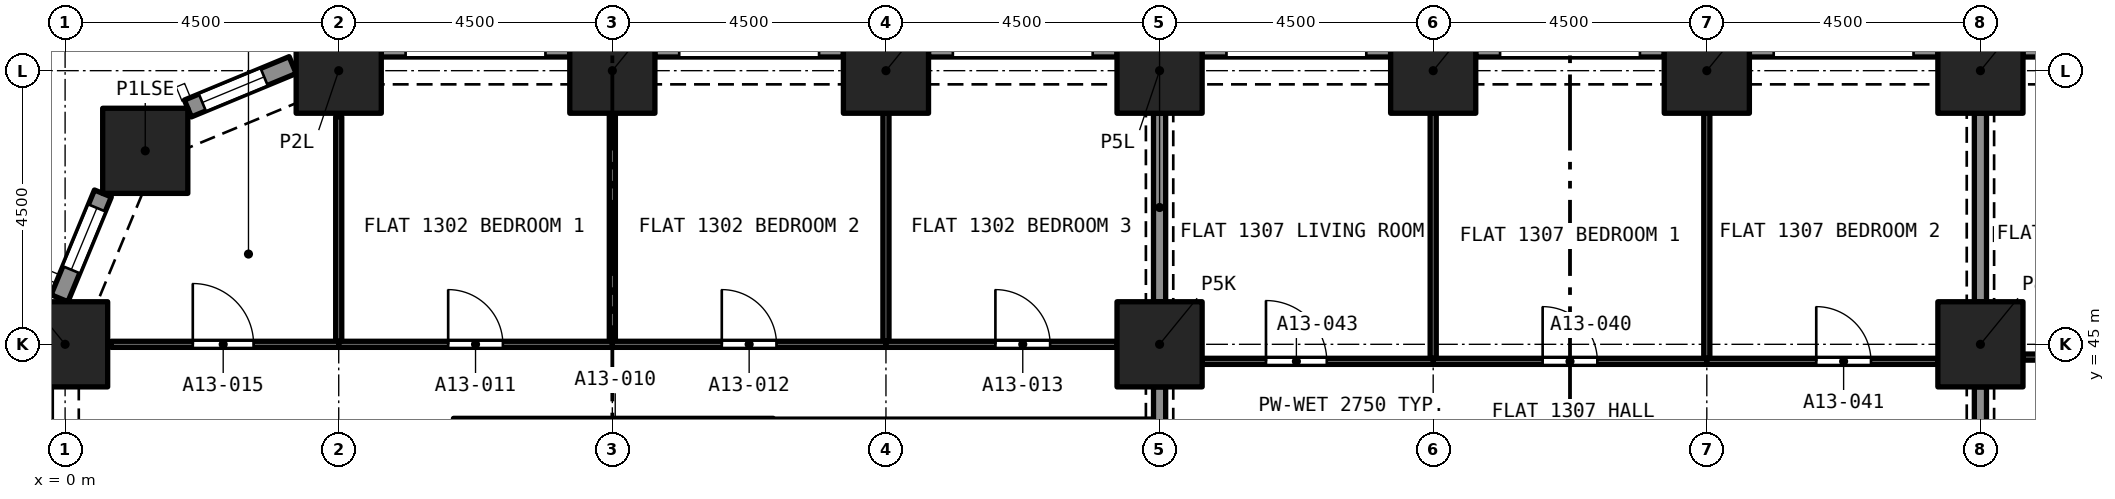
"""IFC4 building model, lengths in metres.
Left out: names, types, materials, properties, quantities, classifications, styles, units other than length and angle.
Written with IfcOpenShell. Run it as: python <this file> out.ifc"""

import sys

from ifc_helpers import new_model, si_unit, direction, frame, frame_2d, origin, origin_2d, place, context, subcontext, project, spatial, rectangle, extrude, element, fill, save


model = new_model("IFC4")
c1 = context("Model", 3, precision=1e-05, world=origin(), true_north=direction((0.0, 1.0)))
c2 = subcontext(c1, "Body", "Model", "MODEL_VIEW")
j1 = project(units=[si_unit("LENGTHUNIT", "METRE"), si_unit("PLANEANGLEUNIT", "RADIAN")], contexts=[c1])
p1 = place(None, origin())
s1 = spatial("IfcSite", under=j1, at=p1, CompositionType="ELEMENT")
p2 = place(p1, origin())
s2 = spatial("IfcBuilding", under=s1, at=p2, CompositionType="ELEMENT")
p3 = place(p2, frame((0.0, 0.0, 52.8)))
s3 = spatial("IfcBuildingStorey", under=s2, at=p3, CompositionType="ELEMENT", Elevation=52.8)
for number, where, z_axis, x_axis in (
    (1, (0.0, 45.0, 0.0), (0.0, 0.0, 1.0), (1.0, 0.0, 0.0)),
    (2, (18.0, 45.0, 0.0), (0.0, 0.0, 1.0), (1.0, 0.0, 0.0)),
    (3, (31.5, 45.0, 0.0), (0.0, 0.0, 1.0), (1.0, 0.0, 0.0)),
    (4, (1.318, 48.182, 0.0), (0.0, 0.0, 1.0), (1.0, 0.0, 0.0)),
    (5, (4.5, 49.5, 0.0), (0.0, 0.0, 1.0), (1.0, 0.0, 0.0)),
    (6, (9.0, 49.5, 0.0), (0.0, 0.0, 1.0), (1.0, 0.0, 0.0)),
    (7, (13.5, 49.5, 0.0), (0.0, 0.0, 1.0), (1.0, 0.0, 0.0)),
    (8, (18.0, 49.5, 0.0), (0.0, 0.0, 1.0), (1.0, 0.0, 0.0)),
    (9, (22.5, 49.5, 0.0), (0.0, 0.0, 1.0), (1.0, 0.0, 0.0)),
    (10, (27.0, 49.5, 0.0), (0.0, 0.0, 1.0), (1.0, 0.0, 0.0)),
    (11, (31.5, 49.5, 0.0), (0.0, 0.0, 1.0), (1.0, 0.0, 0.0)),
):
    element("IfcColumn", number, at=place(p3, frame(where, z_axis=z_axis, x_axis=x_axis)), inside=s3, PredefinedType="COLUMN", context=c2, shape_type="SweptSolid", body=[
        extrude(rectangle(XDim=1.4, YDim=1.4, at=origin_2d()), origin(), (0.0, 0.0, 1.0), 3.2),
    ])
p4 = place(p3, frame((32.2, 49.875, 0.0), z_axis=(0.0, 0.0, 1.0), x_axis=(1.0, 0.0, 0.0)))
e12 = element("IfcWall", 12, at=p4, inside=s3, PredefinedType="SOLIDWALL", context=c2, shape_type="SweptSolid", body=[
    extrude(rectangle(XDim=3.1, YDim=0.3, at=frame_2d((1.55, 0.0))), origin(), (0.0, 0.0, 1.0), 3.2),
])
p5 = place(p4, frame((0.4, 0.0, 0.45)))
e13 = element("IfcOpeningElement", 13, at=p5, cuts=e12, PredefinedType="OPENING", context=c2, shape_type="SweptSolid", body=[
    extrude(rectangle(XDim=2.3, YDim=1.95, at=frame_2d((1.15, 0.975))), frame((0.0, 0.16, 0.0), z_axis=(0.0, -1.0, 0.0), x_axis=(1.0, 0.0, 0.0)), (0.0, 0.0, 1.0), 0.32),
])
p6 = place(p3, frame((27.7, 49.875, 0.0), z_axis=(0.0, 0.0, 1.0), x_axis=(1.0, 0.0, 0.0)))
e14 = element("IfcWall", 14, at=p6, inside=s3, PredefinedType="SOLIDWALL", context=c2, shape_type="SweptSolid", body=[
    extrude(rectangle(XDim=3.1, YDim=0.3, at=frame_2d((1.55, 0.0))), origin(), (0.0, 0.0, 1.0), 3.2),
])
p7 = place(p6, frame((0.4, 0.0, 0.45)))
e15 = element("IfcOpeningElement", 15, at=p7, cuts=e14, PredefinedType="OPENING", context=c2, shape_type="SweptSolid", body=[
    extrude(rectangle(XDim=2.3, YDim=1.95, at=frame_2d((1.15, 0.975))), frame((0.0, 0.16, 0.0), z_axis=(0.0, -1.0, 0.0), x_axis=(1.0, 0.0, 0.0)), (0.0, 0.0, 1.0), 0.32),
])
p8 = place(p3, frame((23.2, 49.875, 0.0), z_axis=(0.0, 0.0, 1.0), x_axis=(1.0, 0.0, 0.0)))
e16 = element("IfcWall", 16, at=p8, inside=s3, PredefinedType="SOLIDWALL", context=c2, shape_type="SweptSolid", body=[
    extrude(rectangle(XDim=3.1, YDim=0.3, at=frame_2d((1.55, 0.0))), origin(), (0.0, 0.0, 1.0), 3.2),
])
p9 = place(p8, frame((0.4, 0.0, 0.45)))
e17 = element("IfcOpeningElement", 17, at=p9, cuts=e16, PredefinedType="OPENING", context=c2, shape_type="SweptSolid", body=[
    extrude(rectangle(XDim=2.3, YDim=1.95, at=frame_2d((1.15, 0.975))), frame((0.0, 0.16, 0.0), z_axis=(0.0, -1.0, 0.0), x_axis=(1.0, 0.0, 0.0)), (0.0, 0.0, 1.0), 0.32),
])
p10 = place(p3, frame((18.7, 49.875, 0.0), z_axis=(0.0, 0.0, 1.0), x_axis=(1.0, 0.0, 0.0)))
e18 = element("IfcWall", 18, at=p10, inside=s3, PredefinedType="SOLIDWALL", context=c2, shape_type="SweptSolid", body=[
    extrude(rectangle(XDim=3.1, YDim=0.3, at=frame_2d((1.55, 0.0))), origin(), (0.0, 0.0, 1.0), 3.2),
])
p11 = place(p10, frame((0.4, 0.0, 0.45)))
e19 = element("IfcOpeningElement", 19, at=p11, cuts=e18, PredefinedType="OPENING", context=c2, shape_type="SweptSolid", body=[
    extrude(rectangle(XDim=2.3, YDim=1.95, at=frame_2d((1.15, 0.975))), frame((0.0, 0.16, 0.0), z_axis=(0.0, -1.0, 0.0), x_axis=(1.0, 0.0, 0.0)), (0.0, 0.0, 1.0), 0.32),
])
p12 = place(p3, frame((14.2, 49.875, 0.0), z_axis=(0.0, 0.0, 1.0), x_axis=(1.0, 0.0, 0.0)))
e20 = element("IfcWall", 20, at=p12, inside=s3, PredefinedType="SOLIDWALL", context=c2, shape_type="SweptSolid", body=[
    extrude(rectangle(XDim=3.1, YDim=0.3, at=frame_2d((1.55, 0.0))), origin(), (0.0, 0.0, 1.0), 3.2),
])
p13 = place(p12, frame((0.4, 0.0, 0.45)))
e21 = element("IfcOpeningElement", 21, at=p13, cuts=e20, PredefinedType="OPENING", context=c2, shape_type="SweptSolid", body=[
    extrude(rectangle(XDim=2.3, YDim=1.95, at=frame_2d((1.15, 0.975))), frame((0.0, 0.16, 0.0), z_axis=(0.0, -1.0, 0.0), x_axis=(1.0, 0.0, 0.0)), (0.0, 0.0, 1.0), 0.32),
])
p14 = place(p3, frame((9.7, 49.875, 0.0), z_axis=(0.0, 0.0, 1.0), x_axis=(1.0, 0.0, 0.0)))
e22 = element("IfcWall", 22, at=p14, inside=s3, PredefinedType="SOLIDWALL", context=c2, shape_type="SweptSolid", body=[
    extrude(rectangle(XDim=3.1, YDim=0.3, at=frame_2d((1.55, 0.0))), origin(), (0.0, 0.0, 1.0), 3.2),
])
p15 = place(p14, frame((0.4, 0.0, 0.45)))
e23 = element("IfcOpeningElement", 23, at=p15, cuts=e22, PredefinedType="OPENING", context=c2, shape_type="SweptSolid", body=[
    extrude(rectangle(XDim=2.3, YDim=1.95, at=frame_2d((1.15, 0.975))), frame((0.0, 0.16, 0.0), z_axis=(0.0, -1.0, 0.0), x_axis=(1.0, 0.0, 0.0)), (0.0, 0.0, 1.0), 0.32),
])
p16 = place(p3, frame((5.2, 49.875, 0.0), z_axis=(0.0, 0.0, 1.0), x_axis=(1.0, 0.0, 0.0)))
e24 = element("IfcWall", 24, at=p16, inside=s3, PredefinedType="SOLIDWALL", context=c2, shape_type="SweptSolid", body=[
    extrude(rectangle(XDim=3.1, YDim=0.3, at=frame_2d((1.55, 0.0))), origin(), (0.0, 0.0, 1.0), 3.2),
])
p17 = place(p16, frame((0.4, 0.0, 0.45)))
e25 = element("IfcOpeningElement", 25, at=p17, cuts=e24, PredefinedType="OPENING", context=c2, shape_type="SweptSolid", body=[
    extrude(rectangle(XDim=2.3, YDim=1.95, at=frame_2d((1.15, 0.975))), frame((0.0, 0.16, 0.0), z_axis=(0.0, -1.0, 0.0), x_axis=(1.0, 0.0, 0.0)), (0.0, 0.0, 1.0), 0.32),
])
p18 = place(p3, frame((2.02, 48.878, 0.0), z_axis=(0.0, 0.0, 1.0), x_axis=(0.923903565336, 0.38262540684, 0.0)))
e26 = element("IfcWall", 26, at=p18, inside=s3, PredefinedType="SOLIDWALL", context=c2, shape_type="SweptSolid", body=[
    extrude(rectangle(XDim=1.865, YDim=0.3, at=frame_2d((0.933, 0.0))), origin(), (0.0, 0.0, 1.0), 3.2),
])
p19 = place(p18, frame((0.258, 0.0, 0.45)))
e27 = element("IfcOpeningElement", 27, at=p19, cuts=e26, PredefinedType="OPENING", context=c2, shape_type="SweptSolid", body=[
    extrude(rectangle(XDim=1.1, YDim=1.95, at=frame_2d((0.55, 0.975))), frame((0.0, 0.16, 0.0), z_axis=(0.0, -1.0, 0.0), x_axis=(1.0, 0.0, 0.0)), (0.0, 0.0, 1.0), 0.32),
])
p20 = place(p3, frame((-0.092, 45.757, 0.0), z_axis=(0.0, 0.0, 1.0), x_axis=(0.382737135771, 0.923857286003, 0.0)))
e28 = element("IfcWall", 28, at=p20, inside=s3, PredefinedType="SOLIDWALL", context=c2, shape_type="SweptSolid", body=[
    extrude(rectangle(XDim=1.865, YDim=0.3, at=frame_2d((0.933, 0.0))), origin(), (0.0, 0.0, 1.0), 3.2),
])
p21 = place(p20, frame((0.508, 0.0, 0.45)))
e29 = element("IfcOpeningElement", 29, at=p21, cuts=e28, PredefinedType="OPENING", context=c2, shape_type="SweptSolid", body=[
    extrude(rectangle(XDim=1.1, YDim=1.95, at=frame_2d((0.55, 0.975))), frame((0.0, 0.16, 0.0), z_axis=(0.0, -1.0, 0.0), x_axis=(1.0, 0.0, 0.0)), (0.0, 0.0, 1.0), 0.32),
])
p22 = place(p3, frame((11.645, 43.72, 0.0), z_axis=(0.0, 0.0, 1.0), x_axis=(-1.0, 0.0, 0.0)))
e30 = element("IfcWall", 30, at=p22, inside=s3, PredefinedType="PARTITIONING", context=c2, shape_type="SweptSolid", body=[
    extrude(rectangle(XDim=5.258, YDim=0.125, at=frame_2d((2.629, 0.0))), origin(), (0.0, 0.0, 1.0), 2.9),
])
p23 = place(p22, frame((2.198, 0.0, 0.0)))
e31 = element("IfcOpeningElement", 31, at=p23, cuts=e30, PredefinedType="OPENING", context=c2, shape_type="SweptSolid", body=[
    extrude(rectangle(XDim=0.8, YDim=2.1, at=frame_2d((0.4, 1.05))), frame((0.0, 0.073, 0.0), z_axis=(0.0, -1.0, 0.0), x_axis=(1.0, 0.0, 0.0)), (0.0, 0.0, 1.0), 0.145),
])
p24 = place(p3, frame((9.0, 45.05, 0.0), z_axis=(0.0, 0.0, 1.0), x_axis=(0.0, 1.0, 0.0)))
e32 = element("IfcWall", 32, at=p24, inside=s3, PredefinedType="PARTITIONING", context=c2, shape_type="SweptSolid", body=[
    extrude(rectangle(XDim=3.75, YDim=0.1, at=frame_2d((1.875, 0.0))), origin(), (0.0, 0.0, 1.0), 2.9),
])
p25 = place(p3, frame((4.5, 45.0, 0.0), z_axis=(0.0, 0.0, 1.0), x_axis=(1.0, 0.0, 0.0)))
e33 = element("IfcWall", 33, at=p25, inside=s3, PredefinedType="PARTITIONING", context=c2, shape_type="SweptSolid", body=[
    extrude(rectangle(XDim=4.5, YDim=0.1, at=frame_2d((2.25, 0.0))), origin(), (0.0, 0.0, 1.0), 2.9),
])
p26 = place(p25, frame((1.8, 0.0, 0.0)))
e34 = element("IfcOpeningElement", 34, at=p26, cuts=e33, PredefinedType="OPENING", context=c2, shape_type="SweptSolid", body=[
    extrude(rectangle(XDim=0.9, YDim=2.1, at=frame_2d((0.45, 1.05))), frame((0.0, 0.06, 0.0), z_axis=(0.0, -1.0, 0.0), x_axis=(1.0, 0.0, 0.0)), (0.0, 0.0, 1.0), 0.12),
])
p27 = place(p3, frame((4.5, 45.05, 0.0), z_axis=(0.0, 0.0, 1.0), x_axis=(0.0, 1.0, 0.0)))
e35 = element("IfcWall", 35, at=p27, inside=s3, PredefinedType="PARTITIONING", context=c2, shape_type="SweptSolid", body=[
    extrude(rectangle(XDim=3.692, YDim=0.1, at=frame_2d((1.846, 0.0))), origin(), (0.0, 0.0, 1.0), 2.9),
])
p28 = place(p3, frame((13.5, 45.05, 0.0), z_axis=(0.0, 0.0, 1.0), x_axis=(0.0, 1.0, 0.0)))
e36 = element("IfcWall", 36, at=p28, inside=s3, PredefinedType="PARTITIONING", context=c2, shape_type="SweptSolid", body=[
    extrude(rectangle(XDim=3.75, YDim=0.1, at=frame_2d((1.875, 0.0))), origin(), (0.0, 0.0, 1.0), 2.9),
])
p29 = place(p3, frame((9.0, 45.0, 0.0), z_axis=(0.0, 0.0, 1.0), x_axis=(1.0, 0.0, 0.0)))
e37 = element("IfcWall", 37, at=p29, inside=s3, PredefinedType="PARTITIONING", context=c2, shape_type="SweptSolid", body=[
    extrude(rectangle(XDim=4.5, YDim=0.1, at=frame_2d((2.25, 0.0))), origin(), (0.0, 0.0, 1.0), 2.9),
])
p30 = place(p29, frame((1.8, 0.0, 0.0)))
e38 = element("IfcOpeningElement", 38, at=p30, cuts=e37, PredefinedType="OPENING", context=c2, shape_type="SweptSolid", body=[
    extrude(rectangle(XDim=0.9, YDim=2.1, at=frame_2d((0.45, 1.05))), frame((0.0, 0.06, 0.0), z_axis=(0.0, -1.0, 0.0), x_axis=(1.0, 0.0, 0.0)), (0.0, 0.0, 1.0), 0.12),
])
p31 = place(p3, frame((13.5, 45.0, 0.0), z_axis=(0.0, 0.0, 1.0), x_axis=(1.0, 0.0, 0.0)))
e39 = element("IfcWall", 39, at=p31, inside=s3, PredefinedType="PARTITIONING", context=c2, shape_type="SweptSolid", body=[
    extrude(rectangle(XDim=3.8, YDim=0.1, at=frame_2d((1.9, 0.0))), origin(), (0.0, 0.0, 1.0), 2.9),
])
p32 = place(p31, frame((1.8, 0.0, 0.0)))
e40 = element("IfcOpeningElement", 40, at=p32, cuts=e39, PredefinedType="OPENING", context=c2, shape_type="SweptSolid", body=[
    extrude(rectangle(XDim=0.9, YDim=2.1, at=frame_2d((0.45, 1.05))), frame((0.0, 0.06, 0.0), z_axis=(0.0, -1.0, 0.0), x_axis=(1.0, 0.0, 0.0)), (0.0, 0.0, 1.0), 0.12),
])
p33 = place(p3, frame((18.0, 45.7, 0.0), z_axis=(0.0, 0.0, 1.0), x_axis=(0.0, 1.0, 0.0)))
e41 = element("IfcWall", 41, at=p33, inside=s3, PredefinedType="PARTITIONING", context=c2, shape_type="SweptSolid", body=[
    extrude(rectangle(XDim=3.1, YDim=0.2, at=frame_2d((1.55, 0.0))), origin(), (0.0, 0.0, 1.0), 2.38),
])
p34 = place(p3, frame((0.758, 45.0, 0.0), z_axis=(0.0, 0.0, 1.0), x_axis=(1.0, 0.0, 0.0)))
e42 = element("IfcWall", 42, at=p34, inside=s3, PredefinedType="PARTITIONING", context=c2, shape_type="SweptSolid", body=[
    extrude(rectangle(XDim=3.742, YDim=0.1, at=frame_2d((1.871, 0.0))), origin(), (0.0, 0.0, 1.0), 2.9),
])
p35 = place(p34, frame((1.342, 0.0, 0.0)))
e43 = element("IfcOpeningElement", 43, at=p35, cuts=e42, PredefinedType="OPENING", context=c2, shape_type="SweptSolid", body=[
    extrude(rectangle(XDim=1.0, YDim=2.1, at=frame_2d((0.5, 1.05))), frame((0.0, 0.06, 0.0), z_axis=(0.0, -1.0, 0.0), x_axis=(1.0, 0.0, 0.0)), (0.0, 0.0, 1.0), 0.12),
])
p36 = place(p3, frame((18.0, 41.2, 0.0), z_axis=(0.0, 0.0, 1.0), x_axis=(0.0, 1.0, 0.0)))
e44 = element("IfcWall", 44, at=p36, inside=s3, PredefinedType="PARTITIONING", context=c2, shape_type="SweptSolid", body=[
    extrude(rectangle(XDim=3.1, YDim=0.2, at=frame_2d((1.55, 0.0))), origin(), (0.0, 0.0, 1.0), 2.38),
])
p37 = place(p3, frame((32.2, 44.79, 0.0), z_axis=(0.0, 0.0, 1.0), x_axis=(1.0, 0.0, 0.0)))
e45 = element("IfcWall", 45, at=p37, inside=s3, PredefinedType="PARTITIONING", context=c2, shape_type="SweptSolid", body=[
    extrude(rectangle(XDim=3.8, YDim=0.1, at=frame_2d((1.9, 0.0))), origin(), (0.0, 0.0, 1.0), 2.9),
])
p38 = place(p37, frame((1.05, 0.0, 0.0)))
e46 = element("IfcOpeningElement", 46, at=p38, cuts=e45, PredefinedType="OPENING", context=c2, shape_type="SweptSolid", body=[
    extrude(rectangle(XDim=1.0, YDim=2.1, at=frame_2d((0.5, 1.05))), frame((0.0, 0.06, 0.0), z_axis=(0.0, -1.0, 0.0), x_axis=(1.0, 0.0, 0.0)), (0.0, 0.0, 1.0), 0.12),
])
for number, where, z_axis, x_axis in (
    (47, (31.5, 41.2, 0.0), (0.0, 0.0, 1.0), (0.0, 1.0, 0.0)),
    (48, (31.5, 45.7, 0.0), (0.0, 0.0, 1.0), (0.0, 1.0, 0.0)),
):
    element("IfcWall", number, at=place(p3, frame(where, z_axis=z_axis, x_axis=x_axis)), inside=s3, PredefinedType="PARTITIONING", context=c2, shape_type="SweptSolid", body=[
        extrude(rectangle(XDim=3.1, YDim=0.2, at=frame_2d((1.55, 0.0))), origin(), (0.0, 0.0, 1.0), 2.38),
    ])
p39 = place(p3, frame((27.0, 44.77, 0.0), z_axis=(0.0, 0.0, 1.0), x_axis=(0.0, 1.0, 0.0)))
e49 = element("IfcWall", 49, at=p39, inside=s3, PredefinedType="PARTITIONING", context=c2, shape_type="SweptSolid", body=[
    extrude(rectangle(XDim=4.03, YDim=0.1, at=frame_2d((2.015, 0.0))), origin(), (0.0, 0.0, 1.0), 2.75),
])
p40 = place(p3, frame((22.5, 44.72, 0.0), z_axis=(0.0, 0.0, 1.0), x_axis=(1.0, 0.0, 0.0)))
e50 = element("IfcWall", 50, at=p40, inside=s3, PredefinedType="PARTITIONING", context=c2, shape_type="SweptSolid", body=[
    extrude(rectangle(XDim=4.5, YDim=0.1, at=frame_2d((2.25, 0.0))), origin(), (0.0, 0.0, 1.0), 2.75),
])
p41 = place(p40, frame((1.8, 0.0, 0.0)))
e51 = element("IfcOpeningElement", 51, at=p41, cuts=e50, PredefinedType="OPENING", context=c2, shape_type="SweptSolid", body=[
    extrude(rectangle(XDim=0.9, YDim=2.1, at=frame_2d((0.45, 1.05))), frame((0.0, 0.06, 0.0), z_axis=(0.0, -1.0, 0.0), x_axis=(1.0, 0.0, 0.0)), (0.0, 0.0, 1.0), 0.12),
])
p42 = place(p3, frame((22.5, 44.77, 0.0), z_axis=(0.0, 0.0, 1.0), x_axis=(0.0, 1.0, 0.0)))
e52 = element("IfcWall", 52, at=p42, inside=s3, PredefinedType="PARTITIONING", context=c2, shape_type="SweptSolid", body=[
    extrude(rectangle(XDim=4.03, YDim=0.1, at=frame_2d((2.015, 0.0))), origin(), (0.0, 0.0, 1.0), 2.75),
])
p43 = place(p3, frame((27.0, 44.72, 0.0), z_axis=(0.0, 0.0, 1.0), x_axis=(1.0, 0.0, 0.0)))
e53 = element("IfcWall", 53, at=p43, inside=s3, PredefinedType="PARTITIONING", context=c2, shape_type="SweptSolid", body=[
    extrude(rectangle(XDim=3.8, YDim=0.1, at=frame_2d((1.9, 0.0))), origin(), (0.0, 0.0, 1.0), 2.75),
])
p44 = place(p43, frame((1.8, 0.0, 0.0)))
e54 = element("IfcOpeningElement", 54, at=p44, cuts=e53, PredefinedType="OPENING", context=c2, shape_type="SweptSolid", body=[
    extrude(rectangle(XDim=0.9, YDim=2.1, at=frame_2d((0.45, 1.05))), frame((0.0, 0.06, 0.0), z_axis=(0.0, -1.0, 0.0), x_axis=(1.0, 0.0, 0.0)), (0.0, 0.0, 1.0), 0.12),
])
p45 = place(p3, frame((18.7, 44.72, 0.0), z_axis=(0.0, 0.0, 1.0), x_axis=(1.0, 0.0, 0.0)))
e55 = element("IfcWall", 55, at=p45, inside=s3, PredefinedType="PARTITIONING", context=c2, shape_type="SweptSolid", body=[
    extrude(rectangle(XDim=3.8, YDim=0.1, at=frame_2d((1.9, 0.0))), origin(), (0.0, 0.0, 1.0), 2.75),
])
p46 = place(p45, frame((1.05, 0.0, 0.0)))
e56 = element("IfcOpeningElement", 56, at=p46, cuts=e55, PredefinedType="OPENING", context=c2, shape_type="SweptSolid", body=[
    extrude(rectangle(XDim=1.0, YDim=2.1, at=frame_2d((0.5, 1.05))), frame((0.0, 0.06, 0.0), z_axis=(0.0, -1.0, 0.0), x_axis=(1.0, 0.0, 0.0)), (0.0, 0.0, 1.0), 0.12),
])
p47 = place(p19, origin())
e57 = element("IfcWindow", 57, at=p47, inside=s3, PartitioningType="SINGLE_PANEL", PredefinedType="WINDOW", context=c2, shape_type="SweptSolid", body=[
    extrude(rectangle(XDim=1.1, YDim=1.95, at=frame_2d((0.55, 0.975))), frame((0.0, 0.03, 0.0), z_axis=(0.0, -1.0, 0.0), x_axis=(1.0, 0.0, 0.0)), (0.0, 0.0, 1.0), 0.06),
])
fill(e27, e57)
p48 = place(p21, origin())
e58 = element("IfcWindow", 58, at=p48, inside=s3, PartitioningType="SINGLE_PANEL", PredefinedType="WINDOW", context=c2, shape_type="SweptSolid", body=[
    extrude(rectangle(XDim=1.1, YDim=1.95, at=frame_2d((0.55, 0.975))), frame((0.0, 0.03, 0.0), z_axis=(0.0, -1.0, 0.0), x_axis=(1.0, 0.0, 0.0)), (0.0, 0.0, 1.0), 0.06),
])
fill(e29, e58)
p49 = place(p26, origin())
e59 = element("IfcDoor", 59, at=p49, inside=s3, OperationType="SINGLE_SWING_RIGHT", PredefinedType="DOOR", context=c2, shape_type="SweptSolid", body=[
    extrude(rectangle(XDim=0.9, YDim=2.1, at=frame_2d((0.45, 1.05))), frame((0.0, 0.025, 0.0), z_axis=(0.0, -1.0, 0.0), x_axis=(1.0, 0.0, 0.0)), (0.0, 0.0, 1.0), 0.05),
])
fill(e34, e59)
p50 = place(p30, origin())
e60 = element("IfcDoor", 60, at=p50, inside=s3, OperationType="SINGLE_SWING_LEFT", PredefinedType="DOOR", context=c2, shape_type="SweptSolid", body=[
    extrude(rectangle(XDim=0.9, YDim=2.1, at=frame_2d((0.45, 1.05))), frame((0.0, 0.025, 0.0), z_axis=(0.0, -1.0, 0.0), x_axis=(1.0, 0.0, 0.0)), (0.0, 0.0, 1.0), 0.05),
])
fill(e38, e60)
p51 = place(p32, origin())
e61 = element("IfcDoor", 61, at=p51, inside=s3, OperationType="SINGLE_SWING_RIGHT", PredefinedType="DOOR", context=c2, shape_type="SweptSolid", body=[
    extrude(rectangle(XDim=0.9, YDim=2.1, at=frame_2d((0.45, 1.05))), frame((0.0, 0.025, 0.0), z_axis=(0.0, -1.0, 0.0), x_axis=(1.0, 0.0, 0.0)), (0.0, 0.0, 1.0), 0.05),
])
fill(e40, e61)
p52 = place(p35, origin())
e62 = element("IfcDoor", 62, at=p52, inside=s3, OperationType="SINGLE_SWING_LEFT", PredefinedType="DOOR", context=c2, shape_type="SweptSolid", body=[
    extrude(rectangle(XDim=1.0, YDim=2.1, at=frame_2d((0.5, 1.05))), frame((0.0, 0.025, 0.0), z_axis=(0.0, -1.0, 0.0), x_axis=(1.0, 0.0, 0.0)), (0.0, 0.0, 1.0), 0.05),
])
fill(e43, e62)
p53 = place(p41, origin())
e63 = element("IfcDoor", 63, at=p53, inside=s3, OperationType="SINGLE_SWING_LEFT", PredefinedType="DOOR", context=c2, shape_type="SweptSolid", body=[
    extrude(rectangle(XDim=0.9, YDim=2.1, at=frame_2d((0.45, 1.05))), frame((0.0, 0.025, 0.0), z_axis=(0.0, -1.0, 0.0), x_axis=(1.0, 0.0, 0.0)), (0.0, 0.0, 1.0), 0.05),
])
fill(e51, e63)
p54 = place(p44, origin())
e64 = element("IfcDoor", 64, at=p54, inside=s3, OperationType="SINGLE_SWING_RIGHT", PredefinedType="DOOR", context=c2, shape_type="SweptSolid", body=[
    extrude(rectangle(XDim=0.9, YDim=2.1, at=frame_2d((0.45, 1.05))), frame((0.0, 0.025, 0.0), z_axis=(0.0, -1.0, 0.0), x_axis=(1.0, 0.0, 0.0)), (0.0, 0.0, 1.0), 0.05),
])
fill(e54, e64)
p55 = place(p46, origin())
e65 = element("IfcDoor", 65, at=p55, inside=s3, OperationType="SINGLE_SWING_LEFT", PredefinedType="DOOR", context=c2, shape_type="SweptSolid", body=[
    extrude(rectangle(XDim=1.0, YDim=2.1, at=frame_2d((0.5, 1.05))), frame((0.0, 0.025, 0.0), z_axis=(0.0, -1.0, 0.0), x_axis=(1.0, 0.0, 0.0)), (0.0, 0.0, 1.0), 0.05),
])
fill(e56, e65)
save(model, sys.argv[1])
